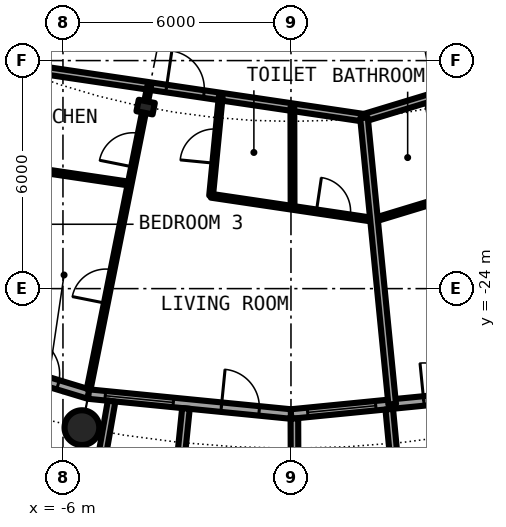
"""IFC4 building model, lengths in metres.
Left out: names, types, materials, properties, quantities, classifications, styles, units other than length and angle.
Written with IfcOpenShell. Run it as: python <this file> out.ifc"""

import sys

from ifc_helpers import new_model, si_unit, direction, frame, frame_2d, origin, origin_2d, place, context, subcontext, project, spatial, rectangle, hollow_circle, i_section, extrude, element, fill, save


model = new_model("IFC4")
c1 = context("Model", 3, precision=1e-05, world=origin(), true_north=direction((0.0, 1.0)))
c2 = subcontext(c1, "Body", "Model", "MODEL_VIEW")
j1 = project(units=[si_unit("LENGTHUNIT", "METRE"), si_unit("PLANEANGLEUNIT", "RADIAN")], contexts=[c1])
p1 = place(None, origin())
s1 = spatial("IfcSite", under=j1, at=p1, CompositionType="ELEMENT")
p2 = place(p1, origin())
s2 = spatial("IfcBuilding", under=s1, at=p2, CompositionType="ELEMENT")
p3 = place(p2, frame((0.0, 0.0, 129.95)))
s3 = spatial("IfcBuildingStorey", under=s2, at=p3, CompositionType="ELEMENT", Elevation=129.95)
p4 = place(p3, frame((-5.501, -27.658, 0.0), z_axis=(0.0, 0.0, 1.0), x_axis=(1.0, 0.0, 0.0)))
e1 = element("IfcColumn", 1, at=p4, inside=s3, PredefinedType="COLUMN", context=c2, shape_type="SweptSolid", body=[
    extrude(hollow_circle(Radius=0.457, WallThickness=0.04, at=origin_2d()), origin(), (0.0, 0.0, 1.0), 3.05),
])
p5 = place(p3, frame((-3.824, -19.223, 0.0), z_axis=(0.0, 0.0, 1.0), x_axis=(-0.195090322016, -0.980785280403, 0.0)))
e2 = element("IfcColumn", 2, at=p5, inside=s3, PredefinedType="COLUMN", context=c2, shape_type="SweptSolid", body=[
    extrude(i_section(OverallWidth=0.307, OverallDepth=0.432, WebThickness=0.021, FlangeThickness=0.04, FilletRadius=0.027, at=origin_2d()), origin(), (0.0, 0.0, 1.0), 3.05),
])
p6 = place(p3, frame((-10.447, -25.222, 0.0), z_axis=(0.0, 0.0, 1.0), x_axis=(0.956965678721, -0.290201119486, 0.0)))
e3 = element("IfcWall", 3, at=p6, inside=s3, PredefinedType="SOLIDWALL", context=c2, shape_type="SweptSolid", body=[
    extrude(rectangle(XDim=5.351, YDim=0.25, at=frame_2d((2.676, 0.0))), origin(), (0.0, 0.0, 1.0), 2.7),
])
p7 = place(p6, frame((0.441, 0.0, 0.3)))
e4 = element("IfcOpeningElement", 4, at=p7, cuts=e3, PredefinedType="OPENING", context=c2, shape_type="SweptSolid", body=[
    extrude(rectangle(XDim=1.8, YDim=2.1, at=frame_2d((0.9, 1.05))), frame((0.0, 0.135, 0.0), z_axis=(0.0, -1.0, 0.0), x_axis=(1.0, 0.0, 0.0)), (0.0, 0.0, 1.0), 0.27),
])
p8 = place(p6, frame((3.51, 0.0, 0.0)))
e5 = element("IfcOpeningElement", 5, at=p8, cuts=e3, PredefinedType="OPENING", context=c2, shape_type="SweptSolid", body=[
    extrude(rectangle(XDim=1.0, YDim=2.2, at=frame_2d((0.5, 1.1))), frame((0.0, 0.135, 0.0), z_axis=(0.0, -1.0, 0.0), x_axis=(1.0, 0.0, 0.0)), (0.0, 0.0, 1.0), 0.27),
])
p9 = place(p3, frame((-5.326, -26.775, 0.0), z_axis=(0.0, 0.0, 1.0), x_axis=(0.995173996315, -0.098126026407, 0.0)))
e6 = element("IfcWall", 6, at=p9, inside=s3, PredefinedType="SOLIDWALL", context=c2, shape_type="SweptSolid", body=[
    extrude(rectangle(XDim=5.352, YDim=0.25, at=frame_2d((2.676, 0.0))), origin(), (0.0, 0.0, 1.0), 2.7),
])
p10 = place(p9, frame((0.441, 0.0, 0.3)))
e7 = element("IfcOpeningElement", 7, at=p10, cuts=e6, PredefinedType="OPENING", context=c2, shape_type="SweptSolid", body=[
    extrude(rectangle(XDim=1.8, YDim=2.1, at=frame_2d((0.9, 1.05))), frame((0.0, 0.135, 0.0), z_axis=(0.0, -1.0, 0.0), x_axis=(1.0, 0.0, 0.0)), (0.0, 0.0, 1.0), 0.27),
])
p11 = place(p9, frame((3.51, 0.0, 0.0)))
e8 = element("IfcOpeningElement", 8, at=p11, cuts=e6, PredefinedType="OPENING", context=c2, shape_type="SweptSolid", body=[
    extrude(rectangle(XDim=1.0, YDim=2.2, at=frame_2d((0.5, 1.1))), frame((0.0, 0.135, 0.0), z_axis=(0.0, -1.0, 0.0), x_axis=(1.0, 0.0, 0.0)), (0.0, 0.0, 1.0), 0.27),
])
p12 = place(p3, frame((-4.72, -26.961, -0.03), z_axis=(0.0, 0.0, 1.0), x_axis=(-0.172463232037, -0.98501595601, 0.0)))
e9 = element("IfcWall", 9, at=p12, inside=s3, PredefinedType="SOLIDWALL", context=c2, shape_type="SweptSolid", body=[
    extrude(rectangle(XDim=2.929, YDim=0.2, at=frame_2d((1.464, 0.0))), origin(), (0.0, 0.0, 1.0), 2.73),
])
p13 = place(p3, frame((-2.764, -27.153, -0.03), z_axis=(0.0, 0.0, 1.0), x_axis=(-0.101505487237, -0.994834979311, 0.0)))
e10 = element("IfcWall", 10, at=p13, inside=s3, PredefinedType="SOLIDWALL", context=c2, shape_type="SweptSolid", body=[
    extrude(rectangle(XDim=3.007, YDim=0.2, at=frame_2d((1.503, 0.0))), origin(), (0.0, 0.0, 1.0), 2.73),
])
p14 = place(p3, frame((0.0, -27.3, 0.0), z_axis=(0.0, 0.0, 1.0), x_axis=(0.995173996315, 0.098126026407, 0.0)))
e11 = element("IfcWall", 11, at=p14, inside=s3, PredefinedType="SOLIDWALL", context=c2, shape_type="SweptSolid", body=[
    extrude(rectangle(XDim=5.352, YDim=0.25, at=frame_2d((2.676, 0.0))), origin(), (0.0, 0.0, 1.0), 2.7),
])
p15 = place(p14, frame((0.441, 0.0, 0.3)))
e12 = element("IfcOpeningElement", 12, at=p15, cuts=e11, PredefinedType="OPENING", context=c2, shape_type="SweptSolid", body=[
    extrude(rectangle(XDim=1.8, YDim=2.1, at=frame_2d((0.9, 1.05))), frame((0.0, 0.135, 0.0), z_axis=(0.0, -1.0, 0.0), x_axis=(1.0, 0.0, 0.0)), (0.0, 0.0, 1.0), 0.27),
])
p16 = place(p14, frame((3.51, 0.0, 0.0)))
e13 = element("IfcOpeningElement", 13, at=p16, cuts=e11, PredefinedType="OPENING", context=c2, shape_type="SweptSolid", body=[
    extrude(rectangle(XDim=1.0, YDim=2.2, at=frame_2d((0.5, 1.1))), frame((0.0, 0.135, 0.0), z_axis=(0.0, -1.0, 0.0), x_axis=(1.0, 0.0, 0.0)), (0.0, 0.0, 1.0), 0.27),
])
p17 = place(p3, frame((0.09, -27.417, -0.03), z_axis=(0.0, 0.0, 1.0), x_axis=(0.00347308367, -0.999993968827, 0.0)))
e14 = element("IfcWall", 14, at=p17, inside=s3, PredefinedType="SOLIDWALL", context=c2, shape_type="SweptSolid", body=[
    extrude(rectangle(XDim=2.882, YDim=0.2, at=frame_2d((1.441, 0.0))), origin(), (0.0, 0.0, 1.0), 2.73),
])
p18 = place(p3, frame((2.586, -27.171, -0.03), z_axis=(0.0, 0.0, 1.0), x_axis=(0.094548432284, -0.995520262954, 0.0)))
e15 = element("IfcWall", 15, at=p18, inside=s3, PredefinedType="SOLIDWALL", context=c2, shape_type="SweptSolid", body=[
    extrude(rectangle(XDim=3.006, YDim=0.2, at=frame_2d((1.503, 0.0))), origin(), (0.0, 0.0, 1.0), 2.73),
])
p19 = place(p3, frame((2.18, -22.195, 0.0), z_axis=(0.0, 0.0, 1.0), x_axis=(0.956838221976, 0.290621088303, 0.0)))
e16 = element("IfcWall", 16, at=p19, inside=s3, PredefinedType="PARTITIONING", context=c2, shape_type="SweptSolid", body=[
    extrude(rectangle(XDim=2.175, YDim=0.1, at=frame_2d((1.087, 0.0))), origin(), (0.0, 0.0, 1.0), 2.7),
])
p20 = place(p3, frame((-8.534, -20.603, 0.0), z_axis=(0.0, 0.0, 1.0), x_axis=(0.989178348771, -0.146718077695, 0.0)))
e17 = element("IfcWall", 17, at=p20, inside=s3, PredefinedType="PARTITIONING", context=c2, shape_type="SweptSolid", body=[
    extrude(rectangle(XDim=4.335, YDim=0.1, at=frame_2d((2.167, 0.0))), origin(), (0.0, 0.0, 1.0), 2.7),
])
p21 = place(p3, frame((-2.102, -21.557, 0.0), z_axis=(0.0, 0.0, 1.0), x_axis=(0.989171386505, -0.146765009863, 0.0)))
e18 = element("IfcWall", 18, at=p21, inside=s3, PredefinedType="PARTITIONING", context=c2, shape_type="SweptSolid", body=[
    extrude(rectangle(XDim=4.335, YDim=0.1, at=frame_2d((2.167, 0.0))), origin(), (0.0, 0.0, 1.0), 2.7),
])
p22 = place(p21, frame((2.801, 0.0, 0.0)))
e19 = element("IfcOpeningElement", 19, at=p22, cuts=e18, PredefinedType="OPENING", context=c2, shape_type="SweptSolid", body=[
    extrude(rectangle(XDim=0.9, YDim=2.3, at=frame_2d((0.45, 1.15))), frame((0.0, 0.06, 0.0), z_axis=(0.0, -1.0, 0.0), x_axis=(1.0, 0.0, 0.0)), (0.0, 0.0, 1.0), 0.12),
])
p23 = place(p3, frame((1.921, -19.506, 0.0), z_axis=(0.0, 0.0, 1.0), x_axis=(0.956929842753, 0.290319265721, 0.0)))
e20 = element("IfcWall", 20, at=p23, inside=s3, PredefinedType="PARTITIONING", context=c2, shape_type="SweptSolid", body=[
    extrude(rectangle(XDim=7.647, YDim=0.2, at=frame_2d((3.824, 0.0))), origin(), (0.0, 0.0, 1.0), 2.39),
])
p24 = place(p23, frame((4.28, 0.0, 0.0)))
e21 = element("IfcOpeningElement", 21, at=p24, cuts=e20, PredefinedType="OPENING", context=c2, shape_type="SweptSolid", body=[
    extrude(rectangle(XDim=1.0, YDim=2.3, at=frame_2d((0.5, 1.15))), frame((0.0, 0.11, 0.0), z_axis=(0.0, -1.0, 0.0), x_axis=(1.0, 0.0, 0.0)), (0.0, 0.0, 1.0), 0.22),
])
p25 = place(p3, frame((-7.495, -18.111, 0.0), z_axis=(0.0, 0.0, 1.0), x_axis=(0.989215286911, -0.146468823102, 0.0)))
e22 = element("IfcWall", 22, at=p25, inside=s3, PredefinedType="PARTITIONING", context=c2, shape_type="SweptSolid", body=[
    extrude(rectangle(XDim=9.531, YDim=0.2, at=frame_2d((4.766, 0.0))), origin(), (0.0, 0.0, 1.0), 2.39),
])
p26 = place(p25, frame((4.26, 0.0, 0.0)))
e23 = element("IfcOpeningElement", 23, at=p26, cuts=e22, PredefinedType="OPENING", context=c2, shape_type="SweptSolid", body=[
    extrude(rectangle(XDim=1.0, YDim=2.3, at=frame_2d((0.5, 1.15))), frame((0.0, 0.11, 0.0), z_axis=(0.0, -1.0, 0.0), x_axis=(1.0, 0.0, 0.0)), (0.0, 0.0, 1.0), 0.22),
])
p27 = place(p3, frame((-5.324, -26.649, 0.0), z_axis=(0.0, 0.0, 1.0), x_axis=(0.195918370415, 0.980620207896, 0.0)))
e24 = element("IfcWall", 24, at=p27, inside=s3, PredefinedType="PARTITIONING", context=c2, shape_type="SweptSolid", body=[
    extrude(rectangle(XDim=7.36, YDim=0.1, at=frame_2d((3.68, 0.0))), origin(), (0.0, 0.0, 1.0), 2.7),
])
p28 = place(p27, frame((5.966, 0.0, 0.0)))
e25 = element("IfcOpeningElement", 25, at=p28, cuts=e24, PredefinedType="OPENING", context=c2, shape_type="SweptSolid", body=[
    extrude(rectangle(XDim=0.9, YDim=2.3, at=frame_2d((0.45, 1.15))), frame((0.0, 0.06, 0.0), z_axis=(0.0, -1.0, 0.0), x_axis=(1.0, 0.0, 0.0)), (0.0, 0.0, 1.0), 0.12),
])
p29 = place(p27, frame((2.308, 0.0, 0.0)))
e26 = element("IfcOpeningElement", 26, at=p29, cuts=e24, PredefinedType="OPENING", context=c2, shape_type="SweptSolid", body=[
    extrude(rectangle(XDim=0.9, YDim=2.3, at=frame_2d((0.45, 1.15))), frame((0.0, 0.06, 0.0), z_axis=(0.0, -1.0, 0.0), x_axis=(1.0, 0.0, 0.0)), (0.0, 0.0, 1.0), 0.12),
])
p30 = place(p3, frame((-3.797, -19.008, 0.0), z_axis=(0.0, 0.0, 1.0), x_axis=(0.196386856719, 0.980526492507, 0.0)))
e27 = element("IfcWall", 27, at=p30, inside=s3, PredefinedType="PARTITIONING", context=c2, shape_type="SweptSolid", body=[
    extrude(rectangle(XDim=0.347, YDim=0.1, at=frame_2d((0.173, 0.0))), origin(), (0.0, 0.0, 1.0), 2.7),
])
p31 = place(p3, frame((-2.102, -21.557, 0.0), z_axis=(0.0, 0.0, 1.0), x_axis=(0.096922256818, 0.995291955224, 0.0)))
e28 = element("IfcWall", 28, at=p31, inside=s3, PredefinedType="PARTITIONING", context=c2, shape_type="SweptSolid", body=[
    extrude(rectangle(XDim=2.622, YDim=0.1, at=frame_2d((1.311, 0.0))), origin(), (0.0, 0.0, 1.0), 2.7),
])
p32 = place(p31, frame((0.861, 0.0, 0.0)))
e29 = element("IfcOpeningElement", 29, at=p32, cuts=e28, PredefinedType="OPENING", context=c2, shape_type="SweptSolid", body=[
    extrude(rectangle(XDim=0.9, YDim=2.3, at=frame_2d((0.45, 1.15))), frame((0.0, 0.06, 0.0), z_axis=(0.0, -1.0, 0.0), x_axis=(1.0, 0.0, 0.0)), (0.0, 0.0, 1.0), 0.12),
])
p33 = place(p3, frame((0.042, -21.875, 0.0), z_axis=(0.0, 0.0, 1.0), x_axis=(-0.001843314841, 0.999998301094, 0.0)))
e30 = element("IfcWall", 30, at=p33, inside=s3, PredefinedType="PARTITIONING", context=c2, shape_type="SweptSolid", body=[
    extrude(rectangle(XDim=2.649, YDim=0.1, at=frame_2d((1.324, 0.0))), origin(), (0.0, 0.0, 1.0), 2.7),
])
p34 = place(p3, frame((1.921, -19.506, 0.0), z_axis=(0.0, 0.0, 1.0), x_axis=(0.098115395479, -0.995175044487, 0.0)))
e31 = element("IfcWall", 31, at=p34, inside=s3, PredefinedType="PARTITIONING", context=c2, shape_type="SweptSolid", body=[
    extrude(rectangle(XDim=7.574, YDim=0.2, at=frame_2d((3.787, 0.0))), origin(), (0.0, 0.0, 1.0), 2.7),
])
p35 = place(p8, origin())
e32 = element("IfcDoor", 32, at=p35, inside=s3, OperationType="SINGLE_SWING_LEFT", PredefinedType="DOOR", context=c2, shape_type="SweptSolid", body=[
    extrude(rectangle(XDim=1.0, YDim=2.2, at=frame_2d((0.5, 1.1))), frame((0.0, 0.025, 0.0), z_axis=(0.0, -1.0, 0.0), x_axis=(1.0, 0.0, 0.0)), (0.0, 0.0, 1.0), 0.05),
])
fill(e5, e32)
p36 = place(p10, origin())
e33 = element("IfcWindow", 33, at=p36, inside=s3, PartitioningType="SINGLE_PANEL", PredefinedType="WINDOW", context=c2, shape_type="SweptSolid", body=[
    extrude(rectangle(XDim=1.8, YDim=2.1, at=frame_2d((0.9, 1.05))), frame((0.0, 0.03, 0.0), z_axis=(0.0, -1.0, 0.0), x_axis=(1.0, 0.0, 0.0)), (0.0, 0.0, 1.0), 0.06),
])
fill(e7, e33)
p37 = place(p11, origin())
e34 = element("IfcDoor", 34, at=p37, inside=s3, OperationType="SINGLE_SWING_LEFT", PredefinedType="DOOR", context=c2, shape_type="SweptSolid", body=[
    extrude(rectangle(XDim=1.0, YDim=2.2, at=frame_2d((0.5, 1.1))), frame((0.0, 0.025, 0.0), z_axis=(0.0, -1.0, 0.0), x_axis=(1.0, 0.0, 0.0)), (0.0, 0.0, 1.0), 0.05),
])
fill(e8, e34)
p38 = place(p15, origin())
e35 = element("IfcWindow", 35, at=p38, inside=s3, PartitioningType="SINGLE_PANEL", PredefinedType="WINDOW", context=c2, shape_type="SweptSolid", body=[
    extrude(rectangle(XDim=1.8, YDim=2.1, at=frame_2d((0.9, 1.05))), frame((0.0, 0.03, 0.0), z_axis=(0.0, -1.0, 0.0), x_axis=(1.0, 0.0, 0.0)), (0.0, 0.0, 1.0), 0.06),
])
fill(e12, e35)
p39 = place(p16, origin())
e36 = element("IfcDoor", 36, at=p39, inside=s3, OperationType="SINGLE_SWING_LEFT", PredefinedType="DOOR", context=c2, shape_type="SweptSolid", body=[
    extrude(rectangle(XDim=1.0, YDim=2.2, at=frame_2d((0.5, 1.1))), frame((0.0, 0.025, 0.0), z_axis=(0.0, -1.0, 0.0), x_axis=(1.0, 0.0, 0.0)), (0.0, 0.0, 1.0), 0.05),
])
fill(e13, e36)
p40 = place(p26, origin())
e37 = element("IfcDoor", 37, at=p40, inside=s3, OperationType="SINGLE_SWING_LEFT", PredefinedType="DOOR", context=c2, shape_type="SweptSolid", body=[
    extrude(rectangle(XDim=1.0, YDim=2.3, at=frame_2d((0.5, 1.15))), frame((0.0, 0.025, 0.0), z_axis=(0.0, -1.0, 0.0), x_axis=(1.0, 0.0, 0.0)), (0.0, 0.0, 1.0), 0.05),
])
fill(e23, e37)
p41 = place(p22, origin())
e38 = element("IfcDoor", 38, at=p41, inside=s3, OperationType="SINGLE_SWING_RIGHT", PredefinedType="DOOR", context=c2, shape_type="SweptSolid", body=[
    extrude(rectangle(XDim=0.9, YDim=2.3, at=frame_2d((0.45, 1.15))), frame((0.0, 0.025, 0.0), z_axis=(0.0, -1.0, 0.0), x_axis=(1.0, 0.0, 0.0)), (0.0, 0.0, 1.0), 0.05),
])
fill(e19, e38)
p42 = place(p32, origin())
e39 = element("IfcDoor", 39, at=p42, inside=s3, OperationType="SINGLE_SWING_LEFT", PredefinedType="DOOR", context=c2, shape_type="SweptSolid", body=[
    extrude(rectangle(XDim=0.9, YDim=2.3, at=frame_2d((0.45, 1.15))), frame((0.0, 0.025, 0.0), z_axis=(0.0, -1.0, 0.0), x_axis=(1.0, 0.0, 0.0)), (0.0, 0.0, 1.0), 0.05),
])
fill(e29, e39)
p43 = place(p28, origin())
e40 = element("IfcDoor", 40, at=p43, inside=s3, OperationType="SINGLE_SWING_RIGHT", PredefinedType="DOOR", context=c2, shape_type="SweptSolid", body=[
    extrude(rectangle(XDim=0.9, YDim=2.3, at=frame_2d((0.45, 1.15))), frame((0.0, 0.025, 0.0), z_axis=(0.0, -1.0, 0.0), x_axis=(1.0, 0.0, 0.0)), (0.0, 0.0, 1.0), 0.05),
])
fill(e25, e40)
p44 = place(p29, origin())
e41 = element("IfcDoor", 41, at=p44, inside=s3, OperationType="SINGLE_SWING_LEFT", PredefinedType="DOOR", context=c2, shape_type="SweptSolid", body=[
    extrude(rectangle(XDim=0.9, YDim=2.3, at=frame_2d((0.45, 1.15))), frame((0.0, 0.025, 0.0), z_axis=(0.0, -1.0, 0.0), x_axis=(1.0, 0.0, 0.0)), (0.0, 0.0, 1.0), 0.05),
])
fill(e26, e41)
save(model, sys.argv[1])
